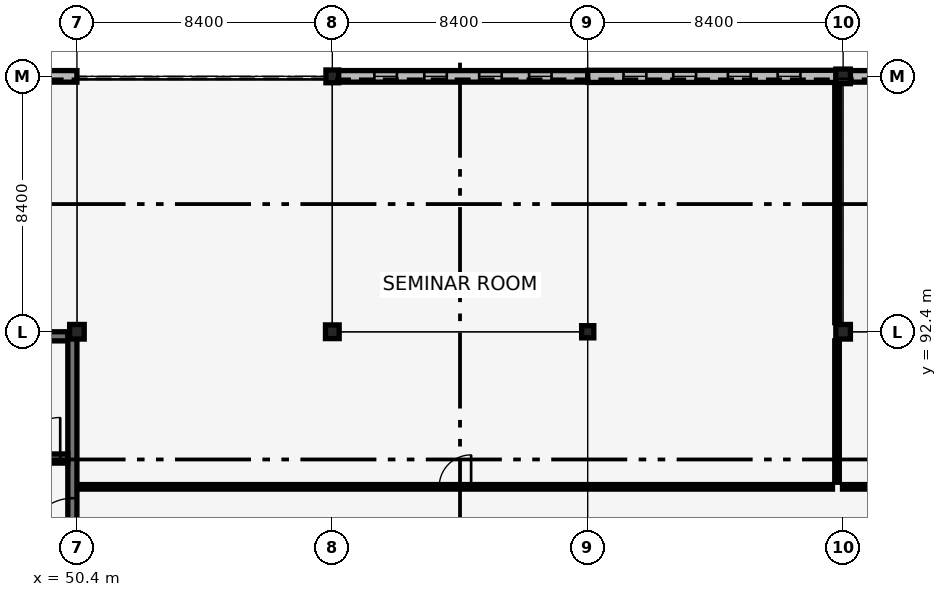
"""IFC4 building model, lengths in metres.
Left out: names, types, materials, properties, quantities, classifications, styles, units other than length and angle.
Written with IfcOpenShell. Run it as: python <this file> out.ifc"""

import sys

from ifc_helpers import new_model, si_unit, direction, frame, frame_2d, origin, origin_2d, place, context, subcontext, project, spatial, rectangle, extrude, element, fill, save


model = new_model("IFC4")
c1 = context("Model", 3, precision=1e-05, world=origin(), true_north=direction((0.0, 1.0)))
c2 = subcontext(c1, "Body", "Model", "MODEL_VIEW")
j1 = project(units=[si_unit("LENGTHUNIT", "METRE"), si_unit("PLANEANGLEUNIT", "RADIAN")], contexts=[c1])
p1 = place(None, origin())
s1 = spatial("IfcSite", under=j1, at=p1, CompositionType="ELEMENT")
p2 = place(p1, origin())
s2 = spatial("IfcBuilding", under=s1, at=p2, CompositionType="ELEMENT")
p3 = place(p2, frame((0.0, 0.0, 5.44)))
s3 = spatial("IfcBuildingStorey", under=s2, at=p3, CompositionType="ELEMENT", Elevation=5.44)
p4 = place(p3, frame((42.15, 92.25, 0.0), z_axis=(0.0, 0.0, 1.0), x_axis=(1.0, 0.0, 0.0)))
e1 = element("IfcWall", 1, at=p4, inside=s3, PredefinedType="SHEAR", context=c2, shape_type="SweptSolid", body=[
    extrude(rectangle(XDim=8.1, YDim=0.3, at=frame_2d((4.05, 0.0))), origin(), (0.0, 0.0, 1.0), 4.12),
])
p5 = place(p3, frame((50.25, 84.15, 0.0), z_axis=(0.0, 0.0, 1.0), x_axis=(0.0, 1.0, 0.0)))
e2 = element("IfcWall", 2, at=p5, inside=s3, PredefinedType="SHEAR", context=c2, shape_type="SweptSolid", body=[
    extrude(rectangle(XDim=8.1, YDim=0.3, at=frame_2d((4.05, 0.0))), origin(), (0.0, 0.0, 1.0), 4.12),
])
p6 = place(p5, frame((1.325, 0.0, 0.0)))
e3 = element("IfcOpeningElement", 3, at=p6, cuts=e2, PredefinedType="OPENING", context=c2, shape_type="SweptSolid", body=[
    extrude(rectangle(XDim=1.45, YDim=2.15, at=frame_2d((0.725, 1.075))), frame((0.0, 0.16, 0.0), z_axis=(0.0, -1.0, 0.0), x_axis=(1.0, 0.0, 0.0)), (0.0, 0.0, 1.0), 0.32),
])
p7 = place(p3, frame((42.3, 88.23, 0.0), z_axis=(0.0, 0.0, 1.0), x_axis=(1.0, 0.0, 0.0)))
e4 = element("IfcWall", 4, at=p7, inside=s3, PredefinedType="SHEAR", context=c2, shape_type="SweptSolid", body=[
    extrude(rectangle(XDim=7.8, YDim=0.3, at=frame_2d((3.9, 0.0))), origin(), (0.0, 0.0, 1.0), 4.12),
])
p8 = place(p7, frame((6.2, 0.0, 0.0)))
e5 = element("IfcOpeningElement", 5, at=p8, cuts=e4, PredefinedType="OPENING", context=c2, shape_type="SweptSolid", body=[
    extrude(rectangle(XDim=1.35, YDim=2.15, at=frame_2d((0.675, 1.075))), frame((0.0, 0.16, 0.0), z_axis=(0.0, -1.0, 0.0), x_axis=(1.0, 0.0, 0.0)), (0.0, 0.0, 1.0), 0.32),
])
p9 = place(p3, frame((50.4, 92.4, 0.0), z_axis=(0.0, 0.0, 1.0), x_axis=(1.0, 0.0, 0.0)))
e6 = element("IfcColumn", 6, at=p9, inside=s3, PredefinedType="COLUMN", context=c2, shape_type="SweptSolid", body=[
    extrude(rectangle(XDim=0.48, YDim=0.48, at=origin_2d()), origin(), (0.0, 0.0, 1.0), 4.12),
])
p10 = place(p3, frame((58.8, 92.4, 0.0), z_axis=(0.0, 0.0, 1.0), x_axis=(1.0, 0.0, 0.0)))
e7 = element("IfcColumn", 7, at=p10, inside=s3, PredefinedType="COLUMN", context=c2, shape_type="SweptSolid", body=[
    extrude(rectangle(XDim=0.45, YDim=0.45, at=origin_2d()), origin(), (0.0, 0.0, 1.0), 4.12),
])
p11 = place(p3, frame((58.8, 100.8, 0.0), z_axis=(0.0, 0.0, 1.0), x_axis=(1.0, 0.0, 0.0)))
e8 = element("IfcColumn", 8, at=p11, inside=s3, PredefinedType="COLUMN", context=c2, shape_type="SweptSolid", body=[
    extrude(rectangle(XDim=0.42, YDim=0.42, at=origin_2d()), origin(), (0.0, 0.0, 1.0), 4.12),
])
p12 = place(p3, frame((67.2, 92.4, 0.0), z_axis=(0.0, 0.0, 1.0), x_axis=(1.0, 0.0, 0.0)))
e9 = element("IfcColumn", 9, at=p12, inside=s3, PredefinedType="COLUMN", context=c2, shape_type="SweptSolid", body=[
    extrude(rectangle(XDim=0.4, YDim=0.4, at=origin_2d()), origin(), (0.0, 0.0, 1.0), 4.12),
])
for number, where, z_axis, x_axis in (
    (10, (75.6, 92.4, 0.0), (0.0, 0.0, 1.0), (1.0, 0.0, 0.0)),
    (11, (75.6, 100.8, 0.0), (0.0, 0.0, 1.0), (1.0, 0.0, 0.0)),
):
    element("IfcColumn", number, at=place(p3, frame(where, z_axis=z_axis, x_axis=x_axis)), inside=s3, PredefinedType="COLUMN", context=c2, shape_type="SweptSolid", body=[
        extrude(rectangle(XDim=0.48, YDim=0.48, at=origin_2d()), origin(), (0.0, 0.0, 1.0), 4.12),
    ])
p13 = place(p3, frame((42.195, 100.8, 0.0), z_axis=(0.0, 0.0, 1.0), x_axis=(1.0, 0.0, 0.0)))
e12 = element("IfcWall", 12, at=p13, inside=s3, PredefinedType="SOLIDWALL", context=c2, shape_type="SweptSolid", body=[
    extrude(rectangle(XDim=8.205, YDim=0.38, at=frame_2d((4.103, 0.0))), origin(), (0.0, 0.0, 1.0), 3.52),
])
p14 = place(p13, frame((1.184, 0.0, 0.75)))
e13 = element("IfcOpeningElement", 13, at=p14, cuts=e12, PredefinedType="OPENING", context=c2, shape_type="SweptSolid", body=[
    extrude(rectangle(XDim=0.75, YDim=2.1, at=frame_2d((0.375, 1.05))), frame((0.0, 0.2, 0.0), z_axis=(0.0, -1.0, 0.0), x_axis=(1.0, 0.0, 0.0)), (0.0, 0.0, 1.0), 0.4),
])
p15 = place(p13, frame((2.825, 0.0, 0.75)))
e14 = element("IfcOpeningElement", 14, at=p15, cuts=e12, PredefinedType="OPENING", context=c2, shape_type="SweptSolid", body=[
    extrude(rectangle(XDim=0.75, YDim=2.1, at=frame_2d((0.375, 1.05))), frame((0.0, 0.2, 0.0), z_axis=(0.0, -1.0, 0.0), x_axis=(1.0, 0.0, 0.0)), (0.0, 0.0, 1.0), 0.4),
])
p16 = place(p13, frame((4.63, 0.0, 0.75)))
e15 = element("IfcOpeningElement", 15, at=p16, cuts=e12, PredefinedType="OPENING", context=c2, shape_type="SweptSolid", body=[
    extrude(rectangle(XDim=0.75, YDim=2.1, at=frame_2d((0.375, 1.05))), frame((0.0, 0.2, 0.0), z_axis=(0.0, -1.0, 0.0), x_axis=(1.0, 0.0, 0.0)), (0.0, 0.0, 1.0), 0.4),
])
p17 = place(p13, frame((6.271, 0.0, 0.75)))
e16 = element("IfcOpeningElement", 16, at=p17, cuts=e12, PredefinedType="OPENING", context=c2, shape_type="SweptSolid", body=[
    extrude(rectangle(XDim=0.75, YDim=2.1, at=frame_2d((0.375, 1.05))), frame((0.0, 0.2, 0.0), z_axis=(0.0, -1.0, 0.0), x_axis=(1.0, 0.0, 0.0)), (0.0, 0.0, 1.0), 0.4),
])
p18 = place(p3, frame((58.995, 100.8, 0.0), z_axis=(0.0, 0.0, 1.0), x_axis=(1.0, 0.0, 0.0)))
e17 = element("IfcWall", 17, at=p18, inside=s3, PredefinedType="SOLIDWALL", context=c2, shape_type="SweptSolid", body=[
    extrude(rectangle(XDim=8.205, YDim=0.38, at=frame_2d((4.103, 0.0))), origin(), (0.0, 0.0, 1.0), 3.52),
])
p19 = place(p18, frame((1.189, 0.0, 0.75)))
e18 = element("IfcOpeningElement", 18, at=p19, cuts=e17, PredefinedType="OPENING", context=c2, shape_type="SweptSolid", body=[
    extrude(rectangle(XDim=0.74, YDim=2.3, at=frame_2d((0.37, 1.15))), frame((0.0, 0.2, 0.0), z_axis=(0.0, -1.0, 0.0), x_axis=(1.0, 0.0, 0.0)), (0.0, 0.0, 1.0), 0.4),
])
p20 = place(p18, frame((2.83, 0.0, 0.75)))
e19 = element("IfcOpeningElement", 19, at=p20, cuts=e17, PredefinedType="OPENING", context=c2, shape_type="SweptSolid", body=[
    extrude(rectangle(XDim=0.74, YDim=2.3, at=frame_2d((0.37, 1.15))), frame((0.0, 0.2, 0.0), z_axis=(0.0, -1.0, 0.0), x_axis=(1.0, 0.0, 0.0)), (0.0, 0.0, 1.0), 0.4),
])
p21 = place(p18, frame((4.635, 0.0, 0.75)))
e20 = element("IfcOpeningElement", 20, at=p21, cuts=e17, PredefinedType="OPENING", context=c2, shape_type="SweptSolid", body=[
    extrude(rectangle(XDim=0.74, YDim=2.3, at=frame_2d((0.37, 1.15))), frame((0.0, 0.2, 0.0), z_axis=(0.0, -1.0, 0.0), x_axis=(1.0, 0.0, 0.0)), (0.0, 0.0, 1.0), 0.4),
])
p22 = place(p18, frame((6.276, 0.0, 0.75)))
e21 = element("IfcOpeningElement", 21, at=p22, cuts=e17, PredefinedType="OPENING", context=c2, shape_type="SweptSolid", body=[
    extrude(rectangle(XDim=0.74, YDim=2.3, at=frame_2d((0.37, 1.15))), frame((0.0, 0.2, 0.0), z_axis=(0.0, -1.0, 0.0), x_axis=(1.0, 0.0, 0.0)), (0.0, 0.0, 1.0), 0.4),
])
p23 = place(p3, frame((67.2, 100.8, 0.0), z_axis=(0.0, 0.0, 1.0), x_axis=(1.0, 0.0, 0.0)))
e22 = element("IfcWall", 22, at=p23, inside=s3, PredefinedType="SOLIDWALL", context=c2, shape_type="SweptSolid", body=[
    extrude(rectangle(XDim=8.175, YDim=0.4, at=frame_2d((4.087, 0.0))), origin(), (0.0, 0.0, 1.0), 3.52),
])
p24 = place(p23, frame((1.178, 0.0, 0.75)))
e23 = element("IfcOpeningElement", 23, at=p24, cuts=e22, PredefinedType="OPENING", context=c2, shape_type="SweptSolid", body=[
    extrude(rectangle(XDim=0.75, YDim=2.1, at=frame_2d((0.375, 1.05))), frame((0.0, 0.21, 0.0), z_axis=(0.0, -1.0, 0.0), x_axis=(1.0, 0.0, 0.0)), (0.0, 0.0, 1.0), 0.42),
])
p25 = place(p23, frame((2.813, 0.0, 0.75)))
e24 = element("IfcOpeningElement", 24, at=p25, cuts=e22, PredefinedType="OPENING", context=c2, shape_type="SweptSolid", body=[
    extrude(rectangle(XDim=0.75, YDim=2.1, at=frame_2d((0.375, 1.05))), frame((0.0, 0.21, 0.0), z_axis=(0.0, -1.0, 0.0), x_axis=(1.0, 0.0, 0.0)), (0.0, 0.0, 1.0), 0.42),
])
p26 = place(p23, frame((4.612, 0.0, 0.75)))
e25 = element("IfcOpeningElement", 25, at=p26, cuts=e22, PredefinedType="OPENING", context=c2, shape_type="SweptSolid", body=[
    extrude(rectangle(XDim=0.75, YDim=2.1, at=frame_2d((0.375, 1.05))), frame((0.0, 0.21, 0.0), z_axis=(0.0, -1.0, 0.0), x_axis=(1.0, 0.0, 0.0)), (0.0, 0.0, 1.0), 0.42),
])
p27 = place(p23, frame((6.247, 0.0, 0.75)))
e26 = element("IfcOpeningElement", 26, at=p27, cuts=e22, PredefinedType="OPENING", context=c2, shape_type="SweptSolid", body=[
    extrude(rectangle(XDim=0.75, YDim=2.1, at=frame_2d((0.375, 1.05))), frame((0.0, 0.21, 0.0), z_axis=(0.0, -1.0, 0.0), x_axis=(1.0, 0.0, 0.0)), (0.0, 0.0, 1.0), 0.42),
])
p28 = place(p3, frame((75.825, 100.8, 0.0), z_axis=(0.0, 0.0, 1.0), x_axis=(1.0, 0.0, 0.0)))
e27 = element("IfcWall", 27, at=p28, inside=s3, PredefinedType="SOLIDWALL", context=c2, shape_type="SweptSolid", body=[
    extrude(rectangle(XDim=8.175, YDim=0.38, at=frame_2d((4.087, 0.0))), origin(), (0.0, 0.0, 1.0), 3.52),
])
p29 = place(p28, frame((1.153, 0.0, 0.75)))
e28 = element("IfcOpeningElement", 28, at=p29, cuts=e27, PredefinedType="OPENING", context=c2, shape_type="SweptSolid", body=[
    extrude(rectangle(XDim=0.8, YDim=2.55, at=frame_2d((0.4, 1.275))), frame((0.0, 0.2, 0.0), z_axis=(0.0, -1.0, 0.0), x_axis=(1.0, 0.0, 0.0)), (0.0, 0.0, 1.0), 0.4),
])
p30 = place(p28, frame((2.788, 0.0, 0.75)))
e29 = element("IfcOpeningElement", 29, at=p30, cuts=e27, PredefinedType="OPENING", context=c2, shape_type="SweptSolid", body=[
    extrude(rectangle(XDim=0.8, YDim=2.55, at=frame_2d((0.4, 1.275))), frame((0.0, 0.2, 0.0), z_axis=(0.0, -1.0, 0.0), x_axis=(1.0, 0.0, 0.0)), (0.0, 0.0, 1.0), 0.4),
])
p31 = place(p28, frame((4.587, 0.0, 0.75)))
e30 = element("IfcOpeningElement", 30, at=p31, cuts=e27, PredefinedType="OPENING", context=c2, shape_type="SweptSolid", body=[
    extrude(rectangle(XDim=0.8, YDim=2.55, at=frame_2d((0.4, 1.275))), frame((0.0, 0.2, 0.0), z_axis=(0.0, -1.0, 0.0), x_axis=(1.0, 0.0, 0.0)), (0.0, 0.0, 1.0), 0.4),
])
p32 = place(p28, frame((6.222, 0.0, 0.75)))
e31 = element("IfcOpeningElement", 31, at=p32, cuts=e27, PredefinedType="OPENING", context=c2, shape_type="SweptSolid", body=[
    extrude(rectangle(XDim=0.8, YDim=2.55, at=frame_2d((0.4, 1.275))), frame((0.0, 0.2, 0.0), z_axis=(0.0, -1.0, 0.0), x_axis=(1.0, 0.0, 0.0)), (0.0, 0.0, 1.0), 0.4),
])
p33 = place(p3, frame((50.43, 87.3, 0.0), z_axis=(0.0, 0.0, 1.0), x_axis=(1.0, 0.0, 0.0)))
e32 = element("IfcWall", 32, at=p33, inside=s3, PredefinedType="PARTITIONING", context=c2, shape_type="SweptSolid", body=[
    extrude(rectangle(XDim=24.82, YDim=0.15, at=frame_2d((12.41, 0.0))), origin(), (0.0, 0.0, 1.0), 3.47),
])
p34 = place(p33, frame((11.885, 0.0, 0.0)))
e33 = element("IfcOpeningElement", 33, at=p34, cuts=e32, PredefinedType="OPENING", context=c2, shape_type="SweptSolid", body=[
    extrude(rectangle(XDim=1.05, YDim=2.15, at=frame_2d((0.525, 1.075))), frame((0.0, 0.085, 0.0), z_axis=(0.0, -1.0, 0.0), x_axis=(1.0, 0.0, 0.0)), (0.0, 0.0, 1.0), 0.17),
])
p35 = place(p3, frame((75.4, 87.45, 0.0), z_axis=(0.0, 0.0, 1.0), x_axis=(0.0, 1.0, 0.0)))
e34 = element("IfcWall", 34, at=p35, inside=s3, PredefinedType="PARTITIONING", context=c2, shape_type="SweptSolid", body=[
    extrude(rectangle(XDim=4.65, YDim=0.15, at=frame_2d((2.325, 0.0))), origin(), (0.0, 0.0, 1.0), 3.44),
])
p36 = place(p3, frame((75.4, 92.7, 0.0), z_axis=(0.0, 0.0, 1.0), x_axis=(0.0, 1.0, 0.0)))
e35 = element("IfcWall", 35, at=p36, inside=s3, PredefinedType="PARTITIONING", context=c2, shape_type="SweptSolid", body=[
    extrude(rectangle(XDim=7.75, YDim=0.15, at=frame_2d((3.875, 0.0))), origin(), (0.0, 0.0, 1.0), 3.44),
])
p37 = place(p3, frame((75.58, 87.3, 0.0), z_axis=(0.0, 0.0, 1.0), x_axis=(1.0, 0.0, 0.0)))
e36 = element("IfcWall", 36, at=p37, inside=s3, PredefinedType="PARTITIONING", context=c2, shape_type="SweptSolid", body=[
    extrude(rectangle(XDim=25.19, YDim=0.15, at=frame_2d((12.595, 0.0))), origin(), (0.0, 0.0, 1.0), 3.47),
])
p38 = place(p37, frame((12.07, 0.0, 0.0)))
e37 = element("IfcOpeningElement", 37, at=p38, cuts=e36, PredefinedType="OPENING", context=c2, shape_type="SweptSolid", body=[
    extrude(rectangle(XDim=1.05, YDim=2.15, at=frame_2d((0.525, 1.075))), frame((0.0, 0.085, 0.0), z_axis=(0.0, -1.0, 0.0), x_axis=(1.0, 0.0, 0.0)), (0.0, 0.0, 1.0), 0.17),
])
p39 = place(p19, origin())
e38 = element("IfcWindow", 38, at=p39, inside=s3, PartitioningType="DOUBLE_PANEL_VERTICAL", PredefinedType="WINDOW", context=c2, shape_type="SweptSolid", body=[
    extrude(rectangle(XDim=0.74, YDim=2.3, at=frame_2d((0.37, 1.15))), frame((0.0, 0.03, 0.0), z_axis=(0.0, -1.0, 0.0), x_axis=(1.0, 0.0, 0.0)), (0.0, 0.0, 1.0), 0.06),
])
fill(e18, e38)
p40 = place(p20, origin())
e39 = element("IfcWindow", 39, at=p40, inside=s3, PartitioningType="DOUBLE_PANEL_VERTICAL", PredefinedType="WINDOW", context=c2, shape_type="SweptSolid", body=[
    extrude(rectangle(XDim=0.74, YDim=2.3, at=frame_2d((0.37, 1.15))), frame((0.0, 0.03, 0.0), z_axis=(0.0, -1.0, 0.0), x_axis=(1.0, 0.0, 0.0)), (0.0, 0.0, 1.0), 0.06),
])
fill(e19, e39)
p41 = place(p21, origin())
e40 = element("IfcWindow", 40, at=p41, inside=s3, PartitioningType="DOUBLE_PANEL_VERTICAL", PredefinedType="WINDOW", context=c2, shape_type="SweptSolid", body=[
    extrude(rectangle(XDim=0.74, YDim=2.3, at=frame_2d((0.37, 1.15))), frame((0.0, 0.03, 0.0), z_axis=(0.0, -1.0, 0.0), x_axis=(1.0, 0.0, 0.0)), (0.0, 0.0, 1.0), 0.06),
])
fill(e20, e40)
p42 = place(p22, origin())
e41 = element("IfcWindow", 41, at=p42, inside=s3, PartitioningType="DOUBLE_PANEL_VERTICAL", PredefinedType="WINDOW", context=c2, shape_type="SweptSolid", body=[
    extrude(rectangle(XDim=0.74, YDim=2.3, at=frame_2d((0.37, 1.15))), frame((0.0, 0.03, 0.0), z_axis=(0.0, -1.0, 0.0), x_axis=(1.0, 0.0, 0.0)), (0.0, 0.0, 1.0), 0.06),
])
fill(e21, e41)
p43 = place(p24, origin())
e42 = element("IfcWindow", 42, at=p43, inside=s3, PartitioningType="DOUBLE_PANEL_VERTICAL", PredefinedType="WINDOW", context=c2, shape_type="SweptSolid", body=[
    extrude(rectangle(XDim=0.75, YDim=2.1, at=frame_2d((0.375, 1.05))), frame((0.0, 0.03, 0.0), z_axis=(0.0, -1.0, 0.0), x_axis=(1.0, 0.0, 0.0)), (0.0, 0.0, 1.0), 0.06),
])
fill(e23, e42)
p44 = place(p25, origin())
e43 = element("IfcWindow", 43, at=p44, inside=s3, PartitioningType="DOUBLE_PANEL_VERTICAL", PredefinedType="WINDOW", context=c2, shape_type="SweptSolid", body=[
    extrude(rectangle(XDim=0.75, YDim=2.1, at=frame_2d((0.375, 1.05))), frame((0.0, 0.03, 0.0), z_axis=(0.0, -1.0, 0.0), x_axis=(1.0, 0.0, 0.0)), (0.0, 0.0, 1.0), 0.06),
])
fill(e24, e43)
p45 = place(p26, origin())
e44 = element("IfcWindow", 44, at=p45, inside=s3, PartitioningType="DOUBLE_PANEL_VERTICAL", PredefinedType="WINDOW", context=c2, shape_type="SweptSolid", body=[
    extrude(rectangle(XDim=0.75, YDim=2.1, at=frame_2d((0.375, 1.05))), frame((0.0, 0.03, 0.0), z_axis=(0.0, -1.0, 0.0), x_axis=(1.0, 0.0, 0.0)), (0.0, 0.0, 1.0), 0.06),
])
fill(e25, e44)
p46 = place(p27, origin())
e45 = element("IfcWindow", 45, at=p46, inside=s3, PartitioningType="DOUBLE_PANEL_VERTICAL", PredefinedType="WINDOW", context=c2, shape_type="SweptSolid", body=[
    extrude(rectangle(XDim=0.75, YDim=2.1, at=frame_2d((0.375, 1.05))), frame((0.0, 0.03, 0.0), z_axis=(0.0, -1.0, 0.0), x_axis=(1.0, 0.0, 0.0)), (0.0, 0.0, 1.0), 0.06),
])
fill(e26, e45)
p47 = place(p8, origin())
e46 = element("IfcDoor", 46, at=p47, inside=s3, OperationType="SINGLE_SWING_RIGHT", PredefinedType="DOOR", context=c2, shape_type="SweptSolid", body=[
    extrude(rectangle(XDim=1.35, YDim=2.15, at=frame_2d((0.675, 1.075))), frame((0.0, 0.025, 0.0), z_axis=(0.0, -1.0, 0.0), x_axis=(1.0, 0.0, 0.0)), (0.0, 0.0, 1.0), 0.05),
])
fill(e5, e46)
p48 = place(p6, origin())
e47 = element("IfcDoor", 47, at=p48, inside=s3, OperationType="DOUBLE_DOOR_SINGLE_SWING", PredefinedType="DOOR", context=c2, shape_type="SweptSolid", body=[
    extrude(rectangle(XDim=1.45, YDim=2.15, at=frame_2d((0.725, 1.075))), frame((0.0, 0.025, 0.0), z_axis=(0.0, -1.0, 0.0), x_axis=(1.0, 0.0, 0.0)), (0.0, 0.0, 1.0), 0.05),
])
fill(e3, e47)
p49 = place(p34, origin())
e48 = element("IfcDoor", 48, at=p49, inside=s3, OperationType="SINGLE_SWING_RIGHT", PredefinedType="DOOR", context=c2, shape_type="SweptSolid", body=[
    extrude(rectangle(XDim=1.05, YDim=2.15, at=frame_2d((0.525, 1.075))), frame((0.0, 0.025, 0.0), z_axis=(0.0, -1.0, 0.0), x_axis=(1.0, 0.0, 0.0)), (0.0, 0.0, 1.0), 0.05),
])
fill(e33, e48)
save(model, sys.argv[1])
